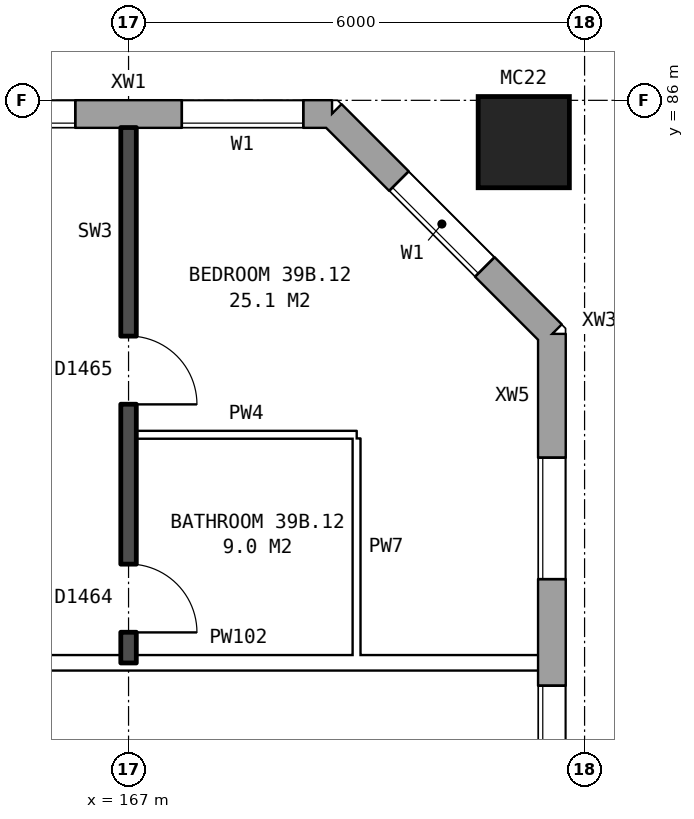
"""IFC4 building model, lengths in metres.
Left out: names, types, materials, properties, quantities, classifications, styles, units other than length and angle.
Written with IfcOpenShell. Run it as: python <this file> out.ifc"""

import sys

from ifc_helpers import new_model, si_unit, direction, frame, frame_2d, origin, origin_2d, place, context, subcontext, project, spatial, rectangle, hollow_rectangle, extrude, element, fill, save


model = new_model("IFC4")
c1 = context("Model", 3, precision=1e-05, world=origin(), true_north=direction((0.0, 1.0)))
c2 = subcontext(c1, "Body", "Model", "MODEL_VIEW")
j1 = project(units=[si_unit("LENGTHUNIT", "METRE"), si_unit("PLANEANGLEUNIT", "RADIAN")], contexts=[c1])
p1 = place(None, origin())
s1 = spatial("IfcSite", under=j1, at=p1, CompositionType="ELEMENT")
p2 = place(p1, origin())
s2 = spatial("IfcBuilding", under=s1, at=p2, CompositionType="ELEMENT")
p3 = place(p2, frame((0.0, 0.0, 139.2)))
s3 = spatial("IfcBuildingStorey", under=s2, at=p3, CompositionType="ELEMENT", Elevation=139.2)
p4 = place(p3, frame((172.2, 85.45, 0.0), z_axis=(0.0, 0.0, 1.0), x_axis=(1.0, 0.0, 0.0)))
e1 = element("IfcColumn", 1, at=p4, inside=s3, PredefinedType="COLUMN", context=c2, shape_type="SweptSolid", body=[
    extrude(hollow_rectangle(XDim=1.2, YDim=1.2, WallThickness=0.065, at=origin_2d()), origin(), (0.0, 0.0, 1.0), 3.1),
])
p5 = place(p3, frame((172.57, 57.075, 0.0), z_axis=(0.0, 0.0, 1.0), x_axis=(0.0, 1.0, 0.0)))
e2 = element("IfcWall", 2, at=p5, inside=s3, PredefinedType="STANDARD", context=c2, shape_type="SweptSolid", body=[
    extrude(rectangle(XDim=25.851, YDim=0.36, at=frame_2d((12.925, 0.0))), origin(), (0.0, 0.0, 1.0), 2.85),
])
p6 = place(p5, frame((1.625, 0.0, 0.8)))
e3 = element("IfcOpeningElement", 3, at=p6, cuts=e2, PredefinedType="OPENING", context=c2, shape_type="SweptSolid", body=[
    extrude(rectangle(XDim=1.6, YDim=1.8, at=frame_2d((0.8, 0.9))), frame((0.0, 0.19, 0.0), z_axis=(0.0, -1.0, 0.0), x_axis=(1.0, 0.0, 0.0)), (0.0, 0.0, 1.0), 0.38),
])
p7 = place(p5, frame((4.625, 0.0, 0.8)))
e4 = element("IfcOpeningElement", 4, at=p7, cuts=e2, PredefinedType="OPENING", context=c2, shape_type="SweptSolid", body=[
    extrude(rectangle(XDim=1.6, YDim=1.8, at=frame_2d((0.8, 0.9))), frame((0.0, 0.19, 0.0), z_axis=(0.0, -1.0, 0.0), x_axis=(1.0, 0.0, 0.0)), (0.0, 0.0, 1.0), 0.38),
])
p8 = place(p5, frame((7.625, 0.0, 0.8)))
e5 = element("IfcOpeningElement", 5, at=p8, cuts=e2, PredefinedType="OPENING", context=c2, shape_type="SweptSolid", body=[
    extrude(rectangle(XDim=1.6, YDim=1.8, at=frame_2d((0.8, 0.9))), frame((0.0, 0.19, 0.0), z_axis=(0.0, -1.0, 0.0), x_axis=(1.0, 0.0, 0.0)), (0.0, 0.0, 1.0), 0.38),
])
p9 = place(p5, frame((10.625, 0.0, 0.8)))
e6 = element("IfcOpeningElement", 6, at=p9, cuts=e2, PredefinedType="OPENING", context=c2, shape_type="SweptSolid", body=[
    extrude(rectangle(XDim=1.6, YDim=1.8, at=frame_2d((0.8, 0.9))), frame((0.0, 0.19, 0.0), z_axis=(0.0, -1.0, 0.0), x_axis=(1.0, 0.0, 0.0)), (0.0, 0.0, 1.0), 0.38),
])
p10 = place(p5, frame((13.625, 0.0, 0.8)))
e7 = element("IfcOpeningElement", 7, at=p10, cuts=e2, PredefinedType="OPENING", context=c2, shape_type="SweptSolid", body=[
    extrude(rectangle(XDim=1.6, YDim=1.8, at=frame_2d((0.8, 0.9))), frame((0.0, 0.19, 0.0), z_axis=(0.0, -1.0, 0.0), x_axis=(1.0, 0.0, 0.0)), (0.0, 0.0, 1.0), 0.38),
])
p11 = place(p5, frame((16.625, 0.0, 0.8)))
e8 = element("IfcOpeningElement", 8, at=p11, cuts=e2, PredefinedType="OPENING", context=c2, shape_type="SweptSolid", body=[
    extrude(rectangle(XDim=1.6, YDim=1.8, at=frame_2d((0.8, 0.9))), frame((0.0, 0.19, 0.0), z_axis=(0.0, -1.0, 0.0), x_axis=(1.0, 0.0, 0.0)), (0.0, 0.0, 1.0), 0.38),
])
p12 = place(p5, frame((19.625, 0.0, 0.8)))
e9 = element("IfcOpeningElement", 9, at=p12, cuts=e2, PredefinedType="OPENING", context=c2, shape_type="SweptSolid", body=[
    extrude(rectangle(XDim=1.6, YDim=1.8, at=frame_2d((0.8, 0.9))), frame((0.0, 0.19, 0.0), z_axis=(0.0, -1.0, 0.0), x_axis=(1.0, 0.0, 0.0)), (0.0, 0.0, 1.0), 0.38),
])
p13 = place(p5, frame((22.625, 0.0, 0.8)))
e10 = element("IfcOpeningElement", 10, at=p13, cuts=e2, PredefinedType="OPENING", context=c2, shape_type="SweptSolid", body=[
    extrude(rectangle(XDim=1.6, YDim=1.8, at=frame_2d((0.8, 0.9))), frame((0.0, 0.19, 0.0), z_axis=(0.0, -1.0, 0.0), x_axis=(1.0, 0.0, 0.0)), (0.0, 0.0, 1.0), 0.38),
])
p14 = place(p3, frame((172.57, 82.925, 0.0), z_axis=(0.0, 0.0, 1.0), x_axis=(-0.707106781187, 0.707106781187, 0.0)))
e11 = element("IfcWall", 11, at=p14, inside=s3, PredefinedType="STANDARD", context=c2, shape_type="SweptSolid", body=[
    extrude(rectangle(XDim=4.094, YDim=0.36, at=frame_2d((2.047, 0.0))), origin(), (0.0, 0.0, 1.0), 2.85),
])
p15 = place(p14, frame((1.247, 0.0, 0.8)))
e12 = element("IfcOpeningElement", 12, at=p15, cuts=e11, PredefinedType="OPENING", context=c2, shape_type="SweptSolid", body=[
    extrude(rectangle(XDim=1.6, YDim=1.8, at=frame_2d((0.8, 0.9))), frame((0.0, 0.19, 0.0), z_axis=(0.0, -1.0, 0.0), x_axis=(1.0, 0.0, 0.0)), (0.0, 0.0, 1.0), 0.38),
])
p16 = place(p3, frame((169.675, 85.82, 0.0), z_axis=(0.0, 0.0, 1.0), x_axis=(-1.0, 0.0, 0.0)))
e13 = element("IfcWall", 13, at=p16, inside=s3, PredefinedType="STANDARD", context=c2, shape_type="SweptSolid", body=[
    extrude(rectangle(XDim=35.601, YDim=0.36, at=frame_2d((17.8, 0.0))), origin(), (0.0, 0.0, 1.0), 2.85),
])
p17 = place(p16, frame((0.375, 0.0, 0.8)))
e14 = element("IfcOpeningElement", 14, at=p17, cuts=e13, PredefinedType="OPENING", context=c2, shape_type="SweptSolid", body=[
    extrude(rectangle(XDim=1.6, YDim=1.8, at=frame_2d((0.8, 0.9))), frame((0.0, 0.19, 0.0), z_axis=(0.0, -1.0, 0.0), x_axis=(1.0, 0.0, 0.0)), (0.0, 0.0, 1.0), 0.38),
])
p18 = place(p16, frame((3.375, 0.0, 0.8)))
e15 = element("IfcOpeningElement", 15, at=p18, cuts=e13, PredefinedType="OPENING", context=c2, shape_type="SweptSolid", body=[
    extrude(rectangle(XDim=1.6, YDim=1.8, at=frame_2d((0.8, 0.9))), frame((0.0, 0.19, 0.0), z_axis=(0.0, -1.0, 0.0), x_axis=(1.0, 0.0, 0.0)), (0.0, 0.0, 1.0), 0.38),
])
p19 = place(p16, frame((6.375, 0.0, 0.8)))
e16 = element("IfcOpeningElement", 16, at=p19, cuts=e13, PredefinedType="OPENING", context=c2, shape_type="SweptSolid", body=[
    extrude(rectangle(XDim=1.6, YDim=1.8, at=frame_2d((0.8, 0.9))), frame((0.0, 0.19, 0.0), z_axis=(0.0, -1.0, 0.0), x_axis=(1.0, 0.0, 0.0)), (0.0, 0.0, 1.0), 0.38),
])
p20 = place(p16, frame((9.375, 0.0, 0.8)))
e17 = element("IfcOpeningElement", 17, at=p20, cuts=e13, PredefinedType="OPENING", context=c2, shape_type="SweptSolid", body=[
    extrude(rectangle(XDim=1.6, YDim=1.8, at=frame_2d((0.8, 0.9))), frame((0.0, 0.19, 0.0), z_axis=(0.0, -1.0, 0.0), x_axis=(1.0, 0.0, 0.0)), (0.0, 0.0, 1.0), 0.38),
])
p21 = place(p16, frame((12.375, 0.0, 0.8)))
e18 = element("IfcOpeningElement", 18, at=p21, cuts=e13, PredefinedType="OPENING", context=c2, shape_type="SweptSolid", body=[
    extrude(rectangle(XDim=1.6, YDim=1.8, at=frame_2d((0.8, 0.9))), frame((0.0, 0.19, 0.0), z_axis=(0.0, -1.0, 0.0), x_axis=(1.0, 0.0, 0.0)), (0.0, 0.0, 1.0), 0.38),
])
p22 = place(p16, frame((14.875, 0.0, 1.65)))
e19 = element("IfcOpeningElement", 19, at=p22, cuts=e13, PredefinedType="OPENING", context=c2, shape_type="SweptSolid", body=[
    extrude(rectangle(XDim=1.4, YDim=0.9, at=frame_2d((0.7, 0.45))), frame((0.0, 0.19, 0.0), z_axis=(0.0, -1.0, 0.0), x_axis=(1.0, 0.0, 0.0)), (0.0, 0.0, 1.0), 0.38),
])
p23 = place(p16, frame((17.825, 0.0, 0.25)))
e20 = element("IfcOpeningElement", 20, at=p23, cuts=e13, PredefinedType="OPENING", context=c2, shape_type="SweptSolid", body=[
    extrude(rectangle(XDim=0.6, YDim=1.2, at=frame_2d((0.3, 0.6))), frame((0.0, 0.19, 0.0), z_axis=(0.0, -1.0, 0.0), x_axis=(1.0, 0.0, 0.0)), (0.0, 0.0, 1.0), 0.38),
])
p24 = place(p16, frame((21.375, 0.0, 0.8)))
e21 = element("IfcOpeningElement", 21, at=p24, cuts=e13, PredefinedType="OPENING", context=c2, shape_type="SweptSolid", body=[
    extrude(rectangle(XDim=1.6, YDim=1.8, at=frame_2d((0.8, 0.9))), frame((0.0, 0.19, 0.0), z_axis=(0.0, -1.0, 0.0), x_axis=(1.0, 0.0, 0.0)), (0.0, 0.0, 1.0), 0.38),
])
p25 = place(p16, frame((24.375, 0.0, 0.8)))
e22 = element("IfcOpeningElement", 22, at=p25, cuts=e13, PredefinedType="OPENING", context=c2, shape_type="SweptSolid", body=[
    extrude(rectangle(XDim=1.6, YDim=1.8, at=frame_2d((0.8, 0.9))), frame((0.0, 0.19, 0.0), z_axis=(0.0, -1.0, 0.0), x_axis=(1.0, 0.0, 0.0)), (0.0, 0.0, 1.0), 0.38),
])
p26 = place(p16, frame((27.375, 0.0, 0.8)))
e23 = element("IfcOpeningElement", 23, at=p26, cuts=e13, PredefinedType="OPENING", context=c2, shape_type="SweptSolid", body=[
    extrude(rectangle(XDim=1.6, YDim=1.8, at=frame_2d((0.8, 0.9))), frame((0.0, 0.19, 0.0), z_axis=(0.0, -1.0, 0.0), x_axis=(1.0, 0.0, 0.0)), (0.0, 0.0, 1.0), 0.38),
])
p27 = place(p16, frame((30.375, 0.0, 0.8)))
e24 = element("IfcOpeningElement", 24, at=p27, cuts=e13, PredefinedType="OPENING", context=c2, shape_type="SweptSolid", body=[
    extrude(rectangle(XDim=1.6, YDim=1.8, at=frame_2d((0.8, 0.9))), frame((0.0, 0.19, 0.0), z_axis=(0.0, -1.0, 0.0), x_axis=(1.0, 0.0, 0.0)), (0.0, 0.0, 1.0), 0.38),
])
p28 = place(p16, frame((33.375, 0.0, 0.8)))
e25 = element("IfcOpeningElement", 25, at=p28, cuts=e13, PredefinedType="OPENING", context=c2, shape_type="SweptSolid", body=[
    extrude(rectangle(XDim=1.6, YDim=1.8, at=frame_2d((0.8, 0.9))), frame((0.0, 0.19, 0.0), z_axis=(0.0, -1.0, 0.0), x_axis=(1.0, 0.0, 0.0)), (0.0, 0.0, 1.0), 0.38),
])
p29 = place(p16, frame((16.825, 0.0, 0.15)))
e26 = element("IfcOpeningElement", 26, at=p29, cuts=e13, PredefinedType="OPENING", context=c2, shape_type="SweptSolid", body=[
    extrude(rectangle(XDim=0.6, YDim=0.9, at=frame_2d((0.3, 0.45))), frame((0.0, 0.19, 0.0), z_axis=(0.0, -1.0, 0.0), x_axis=(1.0, 0.0, 0.0)), (0.0, 0.0, 1.0), 0.38),
])
p30 = place(p16, frame((19.575, 0.0, 1.35)))
e27 = element("IfcOpeningElement", 27, at=p30, cuts=e13, PredefinedType="OPENING", context=c2, shape_type="SweptSolid", body=[
    extrude(rectangle(XDim=0.8, YDim=1.2, at=frame_2d((0.4, 0.6))), frame((0.0, 0.19, 0.0), z_axis=(0.0, -1.0, 0.0), x_axis=(1.0, 0.0, 0.0)), (0.0, 0.0, 1.0), 0.38),
])
p31 = place(p3, frame((155.1, 78.6, 0.0), z_axis=(0.0, 0.0, 1.0), x_axis=(1.0, 0.0, 0.0)))
e28 = element("IfcWall", 28, at=p31, inside=s3, PredefinedType="PARTITIONING", context=c2, shape_type="SweptSolid", body=[
    extrude(rectangle(XDim=17.29, YDim=0.2, at=frame_2d((8.645, 0.0))), origin(), (0.0, 0.0, 1.0), 2.85),
])
p32 = place(p31, frame((1.45, 0.0, 0.0)))
e29 = element("IfcOpeningElement", 29, at=p32, cuts=e28, PredefinedType="OPENING", context=c2, shape_type="SweptSolid", body=[
    extrude(rectangle(XDim=1.0, YDim=2.1, at=frame_2d((0.5, 1.05))), frame((0.0, 0.11, 0.0), z_axis=(0.0, -1.0, 0.0), x_axis=(1.0, 0.0, 0.0)), (0.0, 0.0, 1.0), 0.22),
])
p33 = place(p31, frame((8.4, 0.0, 0.0)))
e30 = element("IfcOpeningElement", 30, at=p33, cuts=e28, PredefinedType="OPENING", context=c2, shape_type="SweptSolid", body=[
    extrude(rectangle(XDim=1.0, YDim=2.1, at=frame_2d((0.5, 1.05))), frame((0.0, 0.11, 0.0), z_axis=(0.0, -1.0, 0.0), x_axis=(1.0, 0.0, 0.0)), (0.0, 0.0, 1.0), 0.22),
])
p34 = place(p3, frame((167.1, 81.6, 0.0), z_axis=(0.0, 0.0, 1.0), x_axis=(1.0, 0.0, 0.0)))
e31 = element("IfcWall", 31, at=p34, inside=s3, PredefinedType="PARTITIONING", context=c2, shape_type="SweptSolid", body=[
    extrude(rectangle(XDim=2.9, YDim=0.1, at=frame_2d((1.45, 0.0))), origin(), (0.0, 0.0, 1.0), 2.85),
])
p35 = place(p3, frame((167.0, 78.6, 0.0), z_axis=(0.0, 0.0, 1.0), x_axis=(0.0, 1.0, 0.0)))
e32 = element("IfcWall", 32, at=p35, inside=s3, PredefinedType="SOLIDWALL", context=c2, shape_type="SweptSolid", body=[
    extrude(rectangle(XDim=7.04, YDim=0.2, at=frame_2d((3.52, 0.0))), origin(), (0.0, 0.0, 1.0), 2.85),
])
p36 = place(p35, frame((3.4, 0.0, 0.0)))
e33 = element("IfcOpeningElement", 33, at=p36, cuts=e32, PredefinedType="OPENING", context=c2, shape_type="SweptSolid", body=[
    extrude(rectangle(XDim=0.9, YDim=2.1, at=frame_2d((0.45, 1.05))), frame((0.0, 0.11, 0.0), z_axis=(0.0, -1.0, 0.0), x_axis=(1.0, 0.0, 0.0)), (0.0, 0.0, 1.0), 0.22),
])
p37 = place(p35, frame((0.4, 0.0, 0.0)))
e34 = element("IfcOpeningElement", 34, at=p37, cuts=e32, PredefinedType="OPENING", context=c2, shape_type="SweptSolid", body=[
    extrude(rectangle(XDim=0.9, YDim=2.1, at=frame_2d((0.45, 1.05))), frame((0.0, 0.11, 0.0), z_axis=(0.0, -1.0, 0.0), x_axis=(1.0, 0.0, 0.0)), (0.0, 0.0, 1.0), 0.22),
])
p38 = place(p3, frame((170.0, 78.7, 0.0), z_axis=(0.0, 0.0, 1.0), x_axis=(0.0, 1.0, 0.0)))
e35 = element("IfcWall", 35, at=p38, inside=s3, PredefinedType="PARTITIONING", context=c2, shape_type="SweptSolid", body=[
    extrude(rectangle(XDim=2.85, YDim=0.1, at=frame_2d((1.425, 0.0))), origin(), (0.0, 0.0, 1.0), 2.85),
])
p39 = place(p12, origin())
e36 = element("IfcWindow", 36, at=p39, inside=s3, PartitioningType="SINGLE_PANEL", PredefinedType="WINDOW", context=c2, shape_type="SweptSolid", body=[
    extrude(rectangle(XDim=1.6, YDim=1.8, at=frame_2d((0.8, 0.9))), frame((0.0, 0.15, 0.0), z_axis=(0.0, -1.0, 0.0), x_axis=(1.0, 0.0, 0.0)), (0.0, 0.0, 1.0), 0.06),
])
fill(e9, e36)
p40 = place(p13, origin())
e37 = element("IfcWindow", 37, at=p40, inside=s3, PartitioningType="SINGLE_PANEL", PredefinedType="WINDOW", context=c2, shape_type="SweptSolid", body=[
    extrude(rectangle(XDim=1.6, YDim=1.8, at=frame_2d((0.8, 0.9))), frame((0.0, 0.15, 0.0), z_axis=(0.0, -1.0, 0.0), x_axis=(1.0, 0.0, 0.0)), (0.0, 0.0, 1.0), 0.06),
])
fill(e10, e37)
p41 = place(p15, origin())
e38 = element("IfcWindow", 38, at=p41, inside=s3, PartitioningType="SINGLE_PANEL", PredefinedType="WINDOW", context=c2, shape_type="SweptSolid", body=[
    extrude(rectangle(XDim=1.6, YDim=1.8, at=frame_2d((0.8, 0.9))), frame((0.0, 0.15, 0.0), z_axis=(0.0, -1.0, 0.0), x_axis=(1.0, 0.0, 0.0)), (0.0, 0.0, 1.0), 0.06),
])
fill(e12, e38)
p42 = place(p17, origin())
e39 = element("IfcWindow", 39, at=p42, inside=s3, PartitioningType="SINGLE_PANEL", PredefinedType="WINDOW", context=c2, shape_type="SweptSolid", body=[
    extrude(rectangle(XDim=1.6, YDim=1.8, at=frame_2d((0.8, 0.9))), frame((0.0, 0.15, 0.0), z_axis=(0.0, -1.0, 0.0), x_axis=(1.0, 0.0, 0.0)), (0.0, 0.0, 1.0), 0.06),
])
fill(e14, e39)
p43 = place(p18, origin())
e40 = element("IfcWindow", 40, at=p43, inside=s3, PartitioningType="SINGLE_PANEL", PredefinedType="WINDOW", context=c2, shape_type="SweptSolid", body=[
    extrude(rectangle(XDim=1.6, YDim=1.8, at=frame_2d((0.8, 0.9))), frame((0.0, 0.15, 0.0), z_axis=(0.0, -1.0, 0.0), x_axis=(1.0, 0.0, 0.0)), (0.0, 0.0, 1.0), 0.06),
])
fill(e15, e40)
p44 = place(p36, frame((0.9, 0.0, 0.0), z_axis=(0.0, 0.0, 1.0), x_axis=(-1.0, 0.0, 0.0)))
e41 = element("IfcDoor", 41, at=p44, inside=s3, OperationType="SINGLE_SWING_RIGHT", PredefinedType="DOOR", context=c2, shape_type="SweptSolid", body=[
    extrude(rectangle(XDim=0.9, YDim=2.1, at=frame_2d((0.45, 1.05))), frame((0.0, 0.025, 0.0), z_axis=(0.0, -1.0, 0.0), x_axis=(1.0, 0.0, 0.0)), (0.0, 0.0, 1.0), 0.05),
])
fill(e33, e41)
p45 = place(p37, frame((0.9, 0.0, 0.0), z_axis=(0.0, 0.0, 1.0), x_axis=(-1.0, 0.0, 0.0)))
e42 = element("IfcDoor", 42, at=p45, inside=s3, OperationType="SINGLE_SWING_RIGHT", PredefinedType="DOOR", context=c2, shape_type="SweptSolid", body=[
    extrude(rectangle(XDim=0.9, YDim=2.1, at=frame_2d((0.45, 1.05))), frame((0.0, 0.025, 0.0), z_axis=(0.0, -1.0, 0.0), x_axis=(1.0, 0.0, 0.0)), (0.0, 0.0, 1.0), 0.05),
])
fill(e34, e42)
save(model, sys.argv[1])
